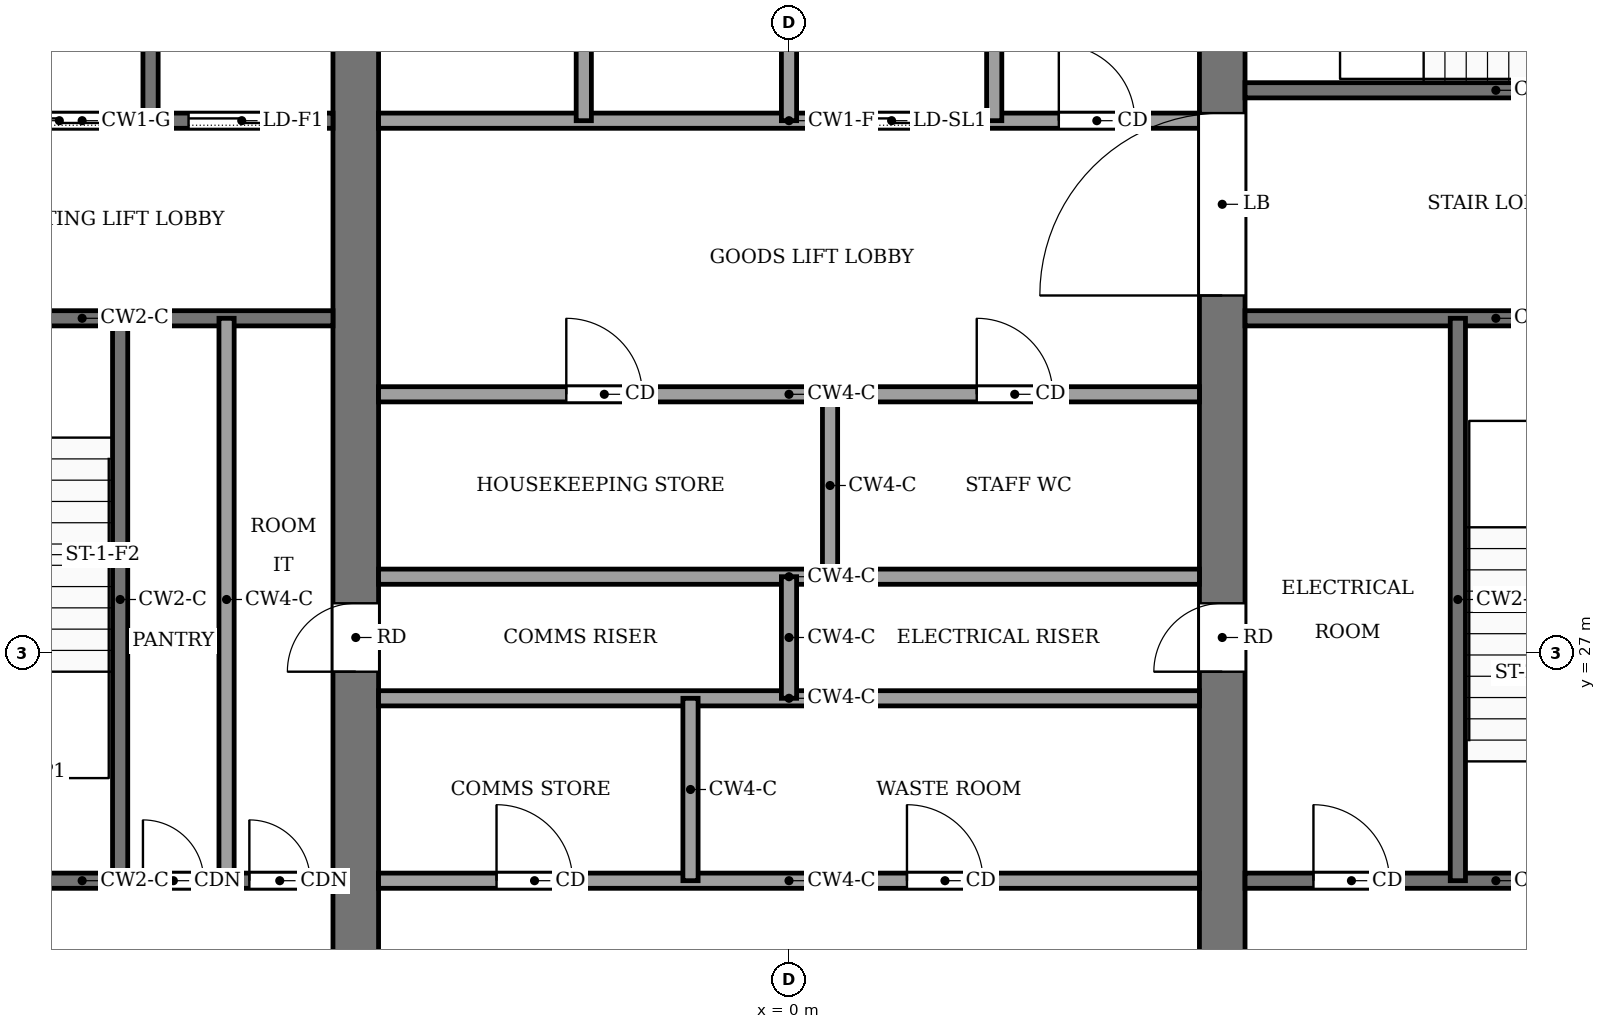
"""IFC4 building model, lengths in metres.
Left out: names, types, materials, properties, quantities, classifications, styles, units other than length and angle.
Written with IfcOpenShell. Run it as: python <this file> out.ifc"""

import sys

from ifc_helpers import new_model, si_unit, direction, frame, frame_2d, origin, place, context, subcontext, project, spatial, rectangle, extrude, element, fill, save


model = new_model("IFC4")
c1 = context("Model", 3, precision=1e-05, world=origin(), true_north=direction((0.0, 1.0)))
c2 = subcontext(c1, "Body", "Model", "MODEL_VIEW")
j1 = project(units=[si_unit("LENGTHUNIT", "METRE"), si_unit("PLANEANGLEUNIT", "RADIAN")], contexts=[c1])
p1 = place(None, origin())
s1 = spatial("IfcSite", under=j1, at=p1, CompositionType="ELEMENT")
p2 = place(p1, origin())
s2 = spatial("IfcBuilding", under=s1, at=p2, CompositionType="ELEMENT")
p3 = place(p2, frame((0.0, 0.0, 314.0)))
s3 = spatial("IfcBuildingStorey", under=s2, at=p3, CompositionType="ELEMENT", Elevation=314.0)
p4 = place(p3, frame((-5.7, 18.4, -0.13), z_axis=(0.0, 0.0, 1.0), x_axis=(0.0, 1.0, 0.0)))
e1 = element("IfcWall", 1, at=p4, inside=s3, PredefinedType="SHEAR", context=c2, shape_type="SweptSolid", body=[
    extrude(rectangle(XDim=19.2, YDim=0.6, at=frame_2d((9.6, 0.0))), origin(), (0.0, 0.0, 1.0), 4.0),
])
p5 = place(p4, frame((8.35, 0.0, 0.13)))
e2 = element("IfcOpeningElement", 2, at=p5, cuts=e1, PredefinedType="OPENING", context=c2, shape_type="SweptSolid", body=[
    extrude(rectangle(XDim=0.9, YDim=2.1, at=frame_2d((0.45, 1.05))), frame((0.0, 0.31, 0.0), z_axis=(0.0, -1.0, 0.0), x_axis=(1.0, 0.0, 0.0)), (0.0, 0.0, 1.0), 0.62),
])
p6 = place(p3, frame((5.7, 18.4, -0.13), z_axis=(0.0, 0.0, 1.0), x_axis=(0.0, 1.0, 0.0)))
e3 = element("IfcWall", 3, at=p6, inside=s3, PredefinedType="SHEAR", context=c2, shape_type="SweptSolid", body=[
    extrude(rectangle(XDim=19.2, YDim=0.6, at=frame_2d((9.6, 0.0))), origin(), (0.0, 0.0, 1.0), 4.0),
])
p7 = place(p6, frame((8.35, 0.0, 0.13)))
e4 = element("IfcOpeningElement", 4, at=p7, cuts=e3, PredefinedType="OPENING", context=c2, shape_type="SweptSolid", body=[
    extrude(rectangle(XDim=0.9, YDim=2.1, at=frame_2d((0.45, 1.05))), frame((0.0, 0.31, 0.0), z_axis=(0.0, -1.0, 0.0), x_axis=(1.0, 0.0, 0.0)), (0.0, 0.0, 1.0), 0.62),
])
p8 = place(p6, frame((13.3, 0.0, 0.13)))
e5 = element("IfcOpeningElement", 5, at=p8, cuts=e3, PredefinedType="OPENING", context=c2, shape_type="SweptSolid", body=[
    extrude(rectangle(XDim=2.4, YDim=2.4, at=frame_2d((1.2, 1.2))), frame((0.0, 0.31, 0.0), z_axis=(0.0, -1.0, 0.0), x_axis=(1.0, 0.0, 0.0)), (0.0, 0.0, 1.0), 0.62),
])
p9 = place(p3, frame((-12.6, 24.0, 0.0), z_axis=(0.0, 0.0, 1.0), x_axis=(1.0, 0.0, 0.0)))
e6 = element("IfcWall", 6, at=p9, inside=s3, PredefinedType="PARTITIONING", context=c2, shape_type="SweptSolid", body=[
    extrude(rectangle(XDim=6.6, YDim=0.2, at=frame_2d((3.3, 0.0))), origin(), (0.0, 0.0, 1.0), 3.87),
])
p10 = place(p9, frame((4.1, 0.0, 0.0)))
e7 = element("IfcOpeningElement", 7, at=p10, cuts=e6, PredefinedType="OPENING", context=c2, shape_type="SweptSolid", body=[
    extrude(rectangle(XDim=0.8, YDim=2.1, at=frame_2d((0.4, 1.05))), frame((0.0, 0.11, 0.0), z_axis=(0.0, -1.0, 0.0), x_axis=(1.0, 0.0, 0.0)), (0.0, 0.0, 1.0), 0.22),
])
p11 = place(p9, frame((5.5, 0.0, 0.0)))
e8 = element("IfcOpeningElement", 8, at=p11, cuts=e6, PredefinedType="OPENING", context=c2, shape_type="SweptSolid", body=[
    extrude(rectangle(XDim=0.8, YDim=2.1, at=frame_2d((0.4, 1.05))), frame((0.0, 0.11, 0.0), z_axis=(0.0, -1.0, 0.0), x_axis=(1.0, 0.0, 0.0)), (0.0, 0.0, 1.0), 0.22),
])
p12 = place(p3, frame((-5.4, 24.0, 0.0), z_axis=(0.0, 0.0, 1.0), x_axis=(1.0, 0.0, 0.0)))
e9 = element("IfcWall", 9, at=p12, inside=s3, PredefinedType="PARTITIONING", context=c2, shape_type="SweptSolid", body=[
    extrude(rectangle(XDim=10.8, YDim=0.2, at=frame_2d((5.4, 0.0))), origin(), (0.0, 0.0, 1.0), 3.87),
])
p13 = place(p12, frame((1.552, 0.0, 0.0)))
e10 = element("IfcOpeningElement", 10, at=p13, cuts=e9, PredefinedType="OPENING", context=c2, shape_type="SweptSolid", body=[
    extrude(rectangle(XDim=1.0, YDim=2.1, at=frame_2d((0.5, 1.05))), frame((0.0, 0.11, 0.0), z_axis=(0.0, -1.0, 0.0), x_axis=(1.0, 0.0, 0.0)), (0.0, 0.0, 1.0), 0.22),
])
p14 = place(p12, frame((6.952, 0.0, 0.0)))
e11 = element("IfcOpeningElement", 11, at=p14, cuts=e9, PredefinedType="OPENING", context=c2, shape_type="SweptSolid", body=[
    extrude(rectangle(XDim=1.0, YDim=2.1, at=frame_2d((0.5, 1.05))), frame((0.0, 0.11, 0.0), z_axis=(0.0, -1.0, 0.0), x_axis=(1.0, 0.0, 0.0)), (0.0, 0.0, 1.0), 0.22),
])
p15 = place(p3, frame((6.0, 24.0, 0.0), z_axis=(0.0, 0.0, 1.0), x_axis=(1.0, 0.0, 0.0)))
e12 = element("IfcWall", 12, at=p15, inside=s3, PredefinedType="PARTITIONING", context=c2, shape_type="SweptSolid", body=[
    extrude(rectangle(XDim=6.6, YDim=0.2, at=frame_2d((3.3, 0.0))), origin(), (0.0, 0.0, 1.0), 3.87),
])
p16 = place(p15, frame((0.9, 0.0, 0.0)))
e13 = element("IfcOpeningElement", 13, at=p16, cuts=e12, PredefinedType="OPENING", context=c2, shape_type="SweptSolid", body=[
    extrude(rectangle(XDim=1.0, YDim=2.1, at=frame_2d((0.5, 1.05))), frame((0.0, 0.11, 0.0), z_axis=(0.0, -1.0, 0.0), x_axis=(1.0, 0.0, 0.0)), (0.0, 0.0, 1.0), 0.22),
])
p17 = place(p15, frame((4.4, 0.0, 0.0)))
e14 = element("IfcOpeningElement", 14, at=p17, cuts=e12, PredefinedType="OPENING", context=c2, shape_type="SweptSolid", body=[
    extrude(rectangle(XDim=1.2, YDim=2.2, at=frame_2d((0.6, 1.1))), frame((0.0, 0.11, 0.0), z_axis=(0.0, -1.0, 0.0), x_axis=(1.0, 0.0, 0.0)), (0.0, 0.0, 1.0), 0.22),
])
for number, where, z_axis, x_axis in (
    (15, (-5.4, 26.4, 0.0), (0.0, 0.0, 1.0), (1.0, 0.0, 0.0)),
    (16, (-5.4, 28.0, 0.0), (0.0, 0.0, 1.0), (1.0, 0.0, 0.0)),
):
    element("IfcWall", number, at=place(p3, frame(where, z_axis=z_axis, x_axis=x_axis)), inside=s3, PredefinedType="PARTITIONING", context=c2, shape_type="SweptSolid", body=[
        extrude(rectangle(XDim=10.8, YDim=0.2, at=frame_2d((5.4, 0.0))), origin(), (0.0, 0.0, 1.0), 3.87),
    ])
p18 = place(p3, frame((-5.4, 30.4, 0.0), z_axis=(0.0, 0.0, 1.0), x_axis=(1.0, 0.0, 0.0)))
e17 = element("IfcWall", 17, at=p18, inside=s3, PredefinedType="PARTITIONING", context=c2, shape_type="SweptSolid", body=[
    extrude(rectangle(XDim=10.8, YDim=0.2, at=frame_2d((5.4, 0.0))), origin(), (0.0, 0.0, 1.0), 3.87),
])
p19 = place(p18, frame((2.47, 0.0, 0.0)))
e18 = element("IfcOpeningElement", 18, at=p19, cuts=e17, PredefinedType="OPENING", context=c2, shape_type="SweptSolid", body=[
    extrude(rectangle(XDim=1.0, YDim=2.1, at=frame_2d((0.5, 1.05))), frame((0.0, 0.11, 0.0), z_axis=(0.0, -1.0, 0.0), x_axis=(1.0, 0.0, 0.0)), (0.0, 0.0, 1.0), 0.22),
])
p20 = place(p18, frame((7.87, 0.0, 0.0)))
e19 = element("IfcOpeningElement", 19, at=p20, cuts=e17, PredefinedType="OPENING", context=c2, shape_type="SweptSolid", body=[
    extrude(rectangle(XDim=1.0, YDim=2.1, at=frame_2d((0.5, 1.05))), frame((0.0, 0.11, 0.0), z_axis=(0.0, -1.0, 0.0), x_axis=(1.0, 0.0, 0.0)), (0.0, 0.0, 1.0), 0.22),
])
p21 = place(p3, frame((-12.6, 31.4, 0.0), z_axis=(0.0, 0.0, 1.0), x_axis=(1.0, 0.0, 0.0)))
e20 = element("IfcWall", 20, at=p21, inside=s3, PredefinedType="PARTITIONING", context=c2, shape_type="SweptSolid", body=[
    extrude(rectangle(XDim=6.6, YDim=0.2, at=frame_2d((3.3, 0.0))), origin(), (0.0, 0.0, 1.0), 3.87),
])
p22 = place(p21, frame((1.0, 0.0, 0.0)))
e21 = element("IfcOpeningElement", 21, at=p22, cuts=e20, PredefinedType="OPENING", context=c2, shape_type="SweptSolid", body=[
    extrude(rectangle(XDim=1.2, YDim=2.2, at=frame_2d((0.6, 1.1))), frame((0.0, 0.11, 0.0), z_axis=(0.0, -1.0, 0.0), x_axis=(1.0, 0.0, 0.0)), (0.0, 0.0, 1.0), 0.22),
])
p23 = place(p3, frame((6.0, 31.4, 0.0), z_axis=(0.0, 0.0, 1.0), x_axis=(1.0, 0.0, 0.0)))
e22 = element("IfcWall", 22, at=p23, inside=s3, PredefinedType="PARTITIONING", context=c2, shape_type="SweptSolid", body=[
    extrude(rectangle(XDim=6.6, YDim=0.2, at=frame_2d((3.3, 0.0))), origin(), (0.0, 0.0, 1.0), 3.87),
])
p24 = place(p3, frame((-12.6, 34.0, 0.0), z_axis=(0.0, 0.0, 1.0), x_axis=(1.0, 0.0, 0.0)))
e23 = element("IfcWall", 23, at=p24, inside=s3, PredefinedType="PARTITIONING", context=c2, shape_type="SweptSolid", body=[
    extrude(rectangle(XDim=6.6, YDim=0.2, at=frame_2d((3.3, 0.0))), origin(), (0.0, 0.0, 1.0), 3.87),
])
p25 = place(p24, frame((4.7, 0.0, 0.0)))
e24 = element("IfcOpeningElement", 24, at=p25, cuts=e23, PredefinedType="OPENING", context=c2, shape_type="SweptSolid", body=[
    extrude(rectangle(XDim=1.4, YDim=2.2, at=frame_2d((0.7, 1.1))), frame((0.0, 0.11, 0.0), z_axis=(0.0, -1.0, 0.0), x_axis=(1.0, 0.0, 0.0)), (0.0, 0.0, 1.0), 0.22),
])
p26 = place(p24, frame((2.3, 0.0, 0.0)))
e25 = element("IfcOpeningElement", 25, at=p26, cuts=e23, PredefinedType="OPENING", context=c2, shape_type="SweptSolid", body=[
    extrude(rectangle(XDim=1.4, YDim=2.2, at=frame_2d((0.7, 1.1))), frame((0.0, 0.11, 0.0), z_axis=(0.0, -1.0, 0.0), x_axis=(1.0, 0.0, 0.0)), (0.0, 0.0, 1.0), 0.22),
])
p27 = place(p24, frame((0.45, 0.0, 0.0)))
e26 = element("IfcOpeningElement", 26, at=p27, cuts=e23, PredefinedType="OPENING", context=c2, shape_type="SweptSolid", body=[
    extrude(rectangle(XDim=0.9, YDim=2.1, at=frame_2d((0.45, 1.05))), frame((0.0, 0.11, 0.0), z_axis=(0.0, -1.0, 0.0), x_axis=(1.0, 0.0, 0.0)), (0.0, 0.0, 1.0), 0.22),
])
p28 = place(p3, frame((-5.4, 34.0, 0.0), z_axis=(0.0, 0.0, 1.0), x_axis=(1.0, 0.0, 0.0)))
e27 = element("IfcWall", 27, at=p28, inside=s3, PredefinedType="PARTITIONING", context=c2, shape_type="SweptSolid", body=[
    extrude(rectangle(XDim=10.8, YDim=0.2, at=frame_2d((5.4, 0.0))), origin(), (0.0, 0.0, 1.0), 3.87),
])
p29 = place(p28, frame((6.15, 0.0, 0.0)))
e28 = element("IfcOpeningElement", 28, at=p29, cuts=e27, PredefinedType="OPENING", context=c2, shape_type="SweptSolid", body=[
    extrude(rectangle(XDim=1.2, YDim=2.2, at=frame_2d((0.6, 1.1))), frame((0.0, 0.11, 0.0), z_axis=(0.0, -1.0, 0.0), x_axis=(1.0, 0.0, 0.0)), (0.0, 0.0, 1.0), 0.22),
])
p30 = place(p28, frame((8.95, 0.0, 0.0)))
e29 = element("IfcOpeningElement", 29, at=p30, cuts=e27, PredefinedType="OPENING", context=c2, shape_type="SweptSolid", body=[
    extrude(rectangle(XDim=1.0, YDim=2.1, at=frame_2d((0.5, 1.05))), frame((0.0, 0.11, 0.0), z_axis=(0.0, -1.0, 0.0), x_axis=(1.0, 0.0, 0.0)), (0.0, 0.0, 1.0), 0.22),
])
p31 = place(p3, frame((6.0, 34.4, 0.0), z_axis=(0.0, 0.0, 1.0), x_axis=(1.0, 0.0, 0.0)))
e30 = element("IfcWall", 30, at=p31, inside=s3, PredefinedType="PARTITIONING", context=c2, shape_type="SweptSolid", body=[
    extrude(rectangle(XDim=6.6, YDim=0.2, at=frame_2d((3.3, 0.0))), origin(), (0.0, 0.0, 1.0), 3.87),
])
p32 = place(p31, frame((4.8, 0.0, 0.0)))
e31 = element("IfcOpeningElement", 31, at=p32, cuts=e30, PredefinedType="OPENING", context=c2, shape_type="SweptSolid", body=[
    extrude(rectangle(XDim=1.2, YDim=2.2, at=frame_2d((0.6, 1.1))), frame((0.0, 0.11, 0.0), z_axis=(0.0, -1.0, 0.0), x_axis=(1.0, 0.0, 0.0)), (0.0, 0.0, 1.0), 0.22),
])
p33 = place(p3, frame((-8.8, 24.0, 0.0), z_axis=(0.0, 0.0, 1.0), x_axis=(0.0, 1.0, 0.0)))
e32 = element("IfcWall", 32, at=p33, inside=s3, PredefinedType="PARTITIONING", context=c2, shape_type="SweptSolid", body=[
    extrude(rectangle(XDim=7.4, YDim=0.2, at=frame_2d((3.7, 0.0))), origin(), (0.0, 0.0, 1.0), 3.87),
])
p34 = place(p3, frame((-8.4, 34.0, 0.0), z_axis=(0.0, 0.0, 1.0), x_axis=(0.0, 1.0, 0.0)))
e33 = element("IfcWall", 33, at=p34, inside=s3, PredefinedType="PARTITIONING", context=c2, shape_type="SweptSolid", body=[
    extrude(rectangle(XDim=3.6, YDim=0.2, at=frame_2d((1.8, 0.0))), origin(), (0.0, 0.0, 1.0), 3.87),
])
p35 = place(p3, frame((-7.4, 24.0, 0.0), z_axis=(0.0, 0.0, 1.0), x_axis=(0.0, 1.0, 0.0)))
e34 = element("IfcWall", 34, at=p35, inside=s3, PredefinedType="PARTITIONING", context=c2, shape_type="SweptSolid", body=[
    extrude(rectangle(XDim=7.4, YDim=0.2, at=frame_2d((3.7, 0.0))), origin(), (0.0, 0.0, 1.0), 3.87),
])
p36 = place(p3, frame((-2.7, 34.0, 0.0), z_axis=(0.0, 0.0, 1.0), x_axis=(0.0, 1.0, 0.0)))
e35 = element("IfcWall", 35, at=p36, inside=s3, PredefinedType="PARTITIONING", context=c2, shape_type="SweptSolid", body=[
    extrude(rectangle(XDim=3.6, YDim=0.2, at=frame_2d((1.8, 0.0))), origin(), (0.0, 0.0, 1.0), 3.87),
])
p37 = place(p3, frame((-1.296, 24.0, 0.0), z_axis=(0.0, 0.0, 1.0), x_axis=(0.0, 1.0, 0.0)))
e36 = element("IfcWall", 36, at=p37, inside=s3, PredefinedType="PARTITIONING", context=c2, shape_type="SweptSolid", body=[
    extrude(rectangle(XDim=2.4, YDim=0.2, at=frame_2d((1.2, 0.0))), origin(), (0.0, 0.0, 1.0), 3.87),
])
p38 = place(p3, frame((0.0, 26.4, 0.0), z_axis=(0.0, 0.0, 1.0), x_axis=(0.0, 1.0, 0.0)))
e37 = element("IfcWall", 37, at=p38, inside=s3, PredefinedType="PARTITIONING", context=c2, shape_type="SweptSolid", body=[
    extrude(rectangle(XDim=1.6, YDim=0.2, at=frame_2d((0.8, 0.0))), origin(), (0.0, 0.0, 1.0), 3.87),
])
p39 = place(p3, frame((0.0, 34.0, 0.0), z_axis=(0.0, 0.0, 1.0), x_axis=(0.0, 1.0, 0.0)))
e38 = element("IfcWall", 38, at=p39, inside=s3, PredefinedType="PARTITIONING", context=c2, shape_type="SweptSolid", body=[
    extrude(rectangle(XDim=3.6, YDim=0.2, at=frame_2d((1.8, 0.0))), origin(), (0.0, 0.0, 1.0), 3.87),
])
p40 = place(p3, frame((0.54, 28.0, 0.0), z_axis=(0.0, 0.0, 1.0), x_axis=(0.0, 1.0, 0.0)))
e39 = element("IfcWall", 39, at=p40, inside=s3, PredefinedType="PARTITIONING", context=c2, shape_type="SweptSolid", body=[
    extrude(rectangle(XDim=2.4, YDim=0.2, at=frame_2d((1.2, 0.0))), origin(), (0.0, 0.0, 1.0), 3.87),
])
p41 = place(p3, frame((2.7, 34.0, 0.0), z_axis=(0.0, 0.0, 1.0), x_axis=(0.0, 1.0, 0.0)))
e40 = element("IfcWall", 40, at=p41, inside=s3, PredefinedType="PARTITIONING", context=c2, shape_type="SweptSolid", body=[
    extrude(rectangle(XDim=3.6, YDim=0.2, at=frame_2d((1.8, 0.0))), origin(), (0.0, 0.0, 1.0), 3.87),
])
p42 = place(p3, frame((8.8, 24.0, 0.0), z_axis=(0.0, 0.0, 1.0), x_axis=(0.0, 1.0, 0.0)))
e41 = element("IfcWall", 41, at=p42, inside=s3, PredefinedType="PARTITIONING", context=c2, shape_type="SweptSolid", body=[
    extrude(rectangle(XDim=7.4, YDim=0.2, at=frame_2d((3.7, 0.0))), origin(), (0.0, 0.0, 1.0), 3.87),
])
p43 = place(p29, origin())
e42 = element("IfcDoor", 42, at=p43, inside=s3, OperationType="SLIDING_TO_LEFT", PredefinedType="DOOR", context=c2, shape_type="SweptSolid", body=[
    extrude(rectangle(XDim=1.2, YDim=2.2, at=frame_2d((0.6, 1.1))), frame((0.0, 0.025, 0.0), z_axis=(0.0, -1.0, 0.0), x_axis=(1.0, 0.0, 0.0)), (0.0, 0.0, 1.0), 0.05),
])
fill(e28, e42)
p44 = place(p25, origin())
e43 = element("IfcDoor", 43, at=p44, inside=s3, OperationType="SLIDING_TO_LEFT", PredefinedType="DOOR", context=c2, shape_type="SweptSolid", body=[
    extrude(rectangle(XDim=1.4, YDim=2.2, at=frame_2d((0.7, 1.1))), frame((0.0, 0.025, 0.0), z_axis=(0.0, -1.0, 0.0), x_axis=(1.0, 0.0, 0.0)), (0.0, 0.0, 1.0), 0.05),
])
fill(e24, e43)
p45 = place(p26, origin())
e44 = element("IfcDoor", 44, at=p45, inside=s3, OperationType="SLIDING_TO_LEFT", PredefinedType="DOOR", context=c2, shape_type="SweptSolid", body=[
    extrude(rectangle(XDim=1.4, YDim=2.2, at=frame_2d((0.7, 1.1))), frame((0.0, 0.025, 0.0), z_axis=(0.0, -1.0, 0.0), x_axis=(1.0, 0.0, 0.0)), (0.0, 0.0, 1.0), 0.05),
])
fill(e25, e44)
p46 = place(p13, origin())
e45 = element("IfcDoor", 45, at=p46, inside=s3, OperationType="SINGLE_SWING_LEFT", PredefinedType="DOOR", context=c2, shape_type="SweptSolid", body=[
    extrude(rectangle(XDim=1.0, YDim=2.1, at=frame_2d((0.5, 1.05))), frame((0.0, 0.025, 0.0), z_axis=(0.0, -1.0, 0.0), x_axis=(1.0, 0.0, 0.0)), (0.0, 0.0, 1.0), 0.05),
])
fill(e10, e45)
p47 = place(p14, origin())
e46 = element("IfcDoor", 46, at=p47, inside=s3, OperationType="SINGLE_SWING_RIGHT", PredefinedType="DOOR", context=c2, shape_type="SweptSolid", body=[
    extrude(rectangle(XDim=1.0, YDim=2.1, at=frame_2d((0.5, 1.05))), frame((0.0, 0.025, 0.0), z_axis=(0.0, -1.0, 0.0), x_axis=(1.0, 0.0, 0.0)), (0.0, 0.0, 1.0), 0.05),
])
fill(e11, e46)
p48 = place(p19, origin())
e47 = element("IfcDoor", 47, at=p48, inside=s3, OperationType="SINGLE_SWING_RIGHT", PredefinedType="DOOR", context=c2, shape_type="SweptSolid", body=[
    extrude(rectangle(XDim=1.0, YDim=2.1, at=frame_2d((0.5, 1.05))), frame((0.0, 0.025, 0.0), z_axis=(0.0, -1.0, 0.0), x_axis=(1.0, 0.0, 0.0)), (0.0, 0.0, 1.0), 0.05),
])
fill(e18, e47)
p49 = place(p20, origin())
e48 = element("IfcDoor", 48, at=p49, inside=s3, OperationType="SINGLE_SWING_LEFT", PredefinedType="DOOR", context=c2, shape_type="SweptSolid", body=[
    extrude(rectangle(XDim=1.0, YDim=2.1, at=frame_2d((0.5, 1.05))), frame((0.0, 0.025, 0.0), z_axis=(0.0, -1.0, 0.0), x_axis=(1.0, 0.0, 0.0)), (0.0, 0.0, 1.0), 0.05),
])
fill(e19, e48)
p50 = place(p10, origin())
e49 = element("IfcDoor", 49, at=p50, inside=s3, OperationType="SINGLE_SWING_LEFT", PredefinedType="DOOR", context=c2, shape_type="SweptSolid", body=[
    extrude(rectangle(XDim=0.8, YDim=2.1, at=frame_2d((0.4, 1.05))), frame((0.0, 0.025, 0.0), z_axis=(0.0, -1.0, 0.0), x_axis=(1.0, 0.0, 0.0)), (0.0, 0.0, 1.0), 0.05),
])
fill(e7, e49)
p51 = place(p11, origin())
e50 = element("IfcDoor", 50, at=p51, inside=s3, OperationType="SINGLE_SWING_RIGHT", PredefinedType="DOOR", context=c2, shape_type="SweptSolid", body=[
    extrude(rectangle(XDim=0.8, YDim=2.1, at=frame_2d((0.4, 1.05))), frame((0.0, 0.025, 0.0), z_axis=(0.0, -1.0, 0.0), x_axis=(1.0, 0.0, 0.0)), (0.0, 0.0, 1.0), 0.05),
])
fill(e8, e50)
p52 = place(p16, origin())
e51 = element("IfcDoor", 51, at=p52, inside=s3, OperationType="SINGLE_SWING_RIGHT", PredefinedType="DOOR", context=c2, shape_type="SweptSolid", body=[
    extrude(rectangle(XDim=1.0, YDim=2.1, at=frame_2d((0.5, 1.05))), frame((0.0, 0.025, 0.0), z_axis=(0.0, -1.0, 0.0), x_axis=(1.0, 0.0, 0.0)), (0.0, 0.0, 1.0), 0.05),
])
fill(e13, e51)
p53 = place(p30, origin())
e52 = element("IfcDoor", 52, at=p53, inside=s3, OperationType="SINGLE_SWING_LEFT", PredefinedType="DOOR", context=c2, shape_type="SweptSolid", body=[
    extrude(rectangle(XDim=1.0, YDim=2.1, at=frame_2d((0.5, 1.05))), frame((0.0, 0.025, 0.0), z_axis=(0.0, -1.0, 0.0), x_axis=(1.0, 0.0, 0.0)), (0.0, 0.0, 1.0), 0.05),
])
fill(e29, e52)
p54 = place(p5, origin())
e53 = element("IfcDoor", 53, at=p54, inside=s3, OperationType="SINGLE_SWING_LEFT", PredefinedType="DOOR", context=c2, shape_type="SweptSolid", body=[
    extrude(rectangle(XDim=0.9, YDim=2.1, at=frame_2d((0.45, 1.05))), frame((0.0, 0.025, 0.0), z_axis=(0.0, -1.0, 0.0), x_axis=(1.0, 0.0, 0.0)), (0.0, 0.0, 1.0), 0.05),
])
fill(e2, e53)
p55 = place(p7, origin())
e54 = element("IfcDoor", 54, at=p55, inside=s3, OperationType="SINGLE_SWING_RIGHT", PredefinedType="DOOR", context=c2, shape_type="SweptSolid", body=[
    extrude(rectangle(XDim=0.9, YDim=2.1, at=frame_2d((0.45, 1.05))), frame((0.0, 0.025, 0.0), z_axis=(0.0, -1.0, 0.0), x_axis=(1.0, 0.0, 0.0)), (0.0, 0.0, 1.0), 0.05),
])
fill(e4, e54)
p56 = place(p8, origin())
e55 = element("IfcDoor", 55, at=p56, inside=s3, OperationType="DOUBLE_DOOR_SINGLE_SWING", PredefinedType="DOOR", context=c2, shape_type="SweptSolid", body=[
    extrude(rectangle(XDim=2.4, YDim=2.4, at=frame_2d((1.2, 1.2))), frame((0.0, 0.025, 0.0), z_axis=(0.0, -1.0, 0.0), x_axis=(1.0, 0.0, 0.0)), (0.0, 0.0, 1.0), 0.05),
])
fill(e5, e55)
save(model, sys.argv[1])
